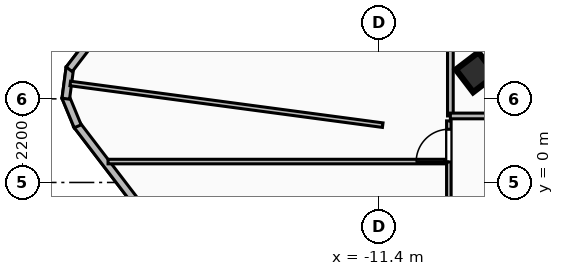
"""IFC4 building model, lengths in metres.
Left out: names, types, materials, properties, quantities, classifications, styles, units other than length and angle.
Written with IfcOpenShell. Run it as: python <this file> out.ifc"""

import sys

from ifc_helpers import new_model, si_unit, direction, frame, frame_2d, origin, origin_2d, place, context, subcontext, project, spatial, rectangle, extrude, element, fill, save


model = new_model("IFC4")
c1 = context("Model", 3, precision=1e-05, world=origin(), true_north=direction((0.0, 1.0)))
c2 = subcontext(c1, "Body", "Model", "MODEL_VIEW")
j1 = project(units=[si_unit("LENGTHUNIT", "METRE"), si_unit("PLANEANGLEUNIT", "RADIAN")], contexts=[c1])
p1 = place(None, origin())
s1 = spatial("IfcSite", under=j1, at=p1, CompositionType="ELEMENT")
p2 = place(p1, origin())
s2 = spatial("IfcBuilding", under=s1, at=p2, CompositionType="ELEMENT")
p3 = place(p2, frame((0.0, 0.0, 232.56)))
s3 = spatial("IfcBuildingStorey", under=s2, at=p3, CompositionType="ELEMENT", Elevation=232.56)
p4 = place(p3, frame((-8.85, 2.9, 0.0), z_axis=(0.0, 0.0, 1.0), x_axis=(0.794414620535, 0.607375839723, 0.0)))
e1 = element("IfcColumn", 1, at=p4, inside=s3, PredefinedType="COLUMN", context=c2, shape_type="SweptSolid", body=[
    extrude(rectangle(XDim=0.75, YDim=0.75, at=origin_2d()), origin(), (0.0, 0.0, 1.0), 3.42),
])
p5 = place(p3, frame((-3.607, -19.074, 0.0), z_axis=(0.0, 0.0, 1.0), x_axis=(-0.607353275552, 0.794431871639, 0.0)))
e2 = element("IfcWall", 2, at=p5, inside=s3, PredefinedType="SOLIDWALL", context=c2, shape_type="SweptSolid", body=[
    extrude(rectangle(XDim=25.924, YDim=0.2, at=frame_2d((12.962, 0.0))), origin(), (0.0, 0.0, 1.0), 3.14),
])
p6 = place(p5, frame((19.321, 0.0, 0.85)))
e3 = element("IfcOpeningElement", 3, at=p6, cuts=e2, PredefinedType="OPENING", context=c2, shape_type="SweptSolid", body=[
    extrude(rectangle(XDim=1.8, YDim=1.6, at=frame_2d((0.9, 0.8))), frame((0.0, 0.11, 0.0), z_axis=(0.0, -1.0, 0.0), x_axis=(1.0, 0.0, 0.0)), (0.0, 0.0, 1.0), 0.22),
])
p7 = place(p3, frame((-19.327, 1.478, 0.0), z_axis=(0.0, 0.0, 1.0), x_axis=(-0.382171551451, 0.924091394431, 0.0)))
e4 = element("IfcWall", 4, at=p7, inside=s3, PredefinedType="SOLIDWALL", context=c2, shape_type="SweptSolid", body=[
    extrude(rectangle(XDim=0.837, YDim=0.2, at=frame_2d((0.419, 0.0))), origin(), (0.0, 0.0, 1.0), 3.14),
])
p8 = place(p3, frame((-19.64, 2.204, 0.0), z_axis=(0.0, 0.0, 1.0), x_axis=(0.130806653943, 0.99140789753, 0.0)))
e5 = element("IfcWall", 5, at=p8, inside=s3, PredefinedType="SOLIDWALL", context=c2, shape_type="SweptSolid", body=[
    extrude(rectangle(XDim=0.825, YDim=0.2, at=frame_2d((0.413, 0.0))), origin(), (0.0, 0.0, 1.0), 3.14),
])
p9 = place(p3, frame((-19.55, 2.977, 0.0), z_axis=(0.0, 0.0, 1.0), x_axis=(0.609274558022, 0.792959338773, 0.0)))
e6 = element("IfcWall", 6, at=p9, inside=s3, PredefinedType="SOLIDWALL", context=c2, shape_type="SweptSolid", body=[
    extrude(rectangle(XDim=0.839, YDim=0.2, at=frame_2d((0.419, 0.0))), origin(), (0.0, 0.0, 1.0), 3.14),
])
p10 = place(p3, frame((-9.52, 1.75, 0.0), z_axis=(0.0, 0.0, 1.0), x_axis=(0.0, 1.0, 0.0)))
e7 = element("IfcWall", 7, at=p10, inside=s3, PredefinedType="PARTITIONING", context=c2, shape_type="SweptSolid", body=[
    extrude(rectangle(XDim=6.63, YDim=0.15, at=frame_2d((3.315, 0.0))), origin(), (0.0, 0.0, 1.0), 3.14),
])
p11 = place(p3, frame((-7.85, 1.75, 0.0), z_axis=(0.0, 0.0, 1.0), x_axis=(-1.0, 0.0, 0.0)))
e8 = element("IfcWall", 8, at=p11, inside=s3, PredefinedType="PARTITIONING", context=c2, shape_type="SweptSolid", body=[
    extrude(rectangle(XDim=1.67, YDim=0.15, at=frame_2d((0.835, 0.0))), origin(), (0.0, 0.0, 1.0), 2.37),
])
p12 = place(p3, frame((-18.528, 0.55, 0.0), z_axis=(0.0, 0.0, 1.0), x_axis=(1.0, 0.0, 0.0)))
e9 = element("IfcWall", 9, at=p12, inside=s3, PredefinedType="PARTITIONING", context=c2, shape_type="SweptSolid", body=[
    extrude(rectangle(XDim=8.868, YDim=0.12, at=frame_2d((4.434, 0.0))), origin(), (0.0, 0.0, 1.0), 3.14),
])
p13 = place(p3, frame((-9.56, -1.62, 0.0), z_axis=(0.0, 0.0, 1.0), x_axis=(0.0, 1.0, 0.0)))
e10 = element("IfcWall", 10, at=p13, inside=s3, PredefinedType="PARTITIONING", context=c2, shape_type="SweptSolid", body=[
    extrude(rectangle(XDim=3.24, YDim=0.12, at=frame_2d((1.62, 0.0))), origin(), (0.0, 0.0, 1.0), 3.14),
])
p14 = place(p13, frame((0.22, 0.0, 0.0)))
e11 = element("IfcOpeningElement", 11, at=p14, cuts=e10, PredefinedType="OPENING", context=c2, shape_type="SweptSolid", body=[
    extrude(rectangle(XDim=0.86, YDim=2.04, at=frame_2d((0.43, 1.02))), frame((0.0, 0.07, 0.0), z_axis=(0.0, -1.0, 0.0), x_axis=(1.0, 0.0, 0.0)), (0.0, 0.0, 1.0), 0.14),
])
p15 = place(p13, frame((2.16, 0.0, 0.0)))
e12 = element("IfcOpeningElement", 12, at=p15, cuts=e10, PredefinedType="OPENING", context=c2, shape_type="SweptSolid", body=[
    extrude(rectangle(XDim=0.86, YDim=2.04, at=frame_2d((0.43, 1.02))), frame((0.0, 0.07, 0.0), z_axis=(0.0, -1.0, 0.0), x_axis=(1.0, 0.0, 0.0)), (0.0, 0.0, 1.0), 0.14),
])
p16 = place(p3, frame((-11.3, 1.508, 0.0), z_axis=(0.0, 0.0, 1.0), x_axis=(-0.99121735818, 0.132242764804, 0.0)))
e13 = element("IfcWall", 13, at=p16, inside=s3, PredefinedType="PARTITIONING", context=c2, shape_type="SweptSolid", body=[
    extrude(rectangle(XDim=8.295, YDim=0.12, at=frame_2d((4.147, 0.0))), origin(), (0.0, 0.0, 1.0), 3.14),
])
p17 = place(p15, origin())
e14 = element("IfcDoor", 14, at=p17, inside=s3, OperationType="SINGLE_SWING_LEFT", PredefinedType="DOOR", context=c2, shape_type="SweptSolid", body=[
    extrude(rectangle(XDim=0.86, YDim=2.04, at=frame_2d((0.43, 1.02))), frame((0.0, 0.025, 0.0), z_axis=(0.0, -1.0, 0.0), x_axis=(1.0, 0.0, 0.0)), (0.0, 0.0, 1.0), 0.05),
])
fill(e12, e14)
save(model, sys.argv[1])
